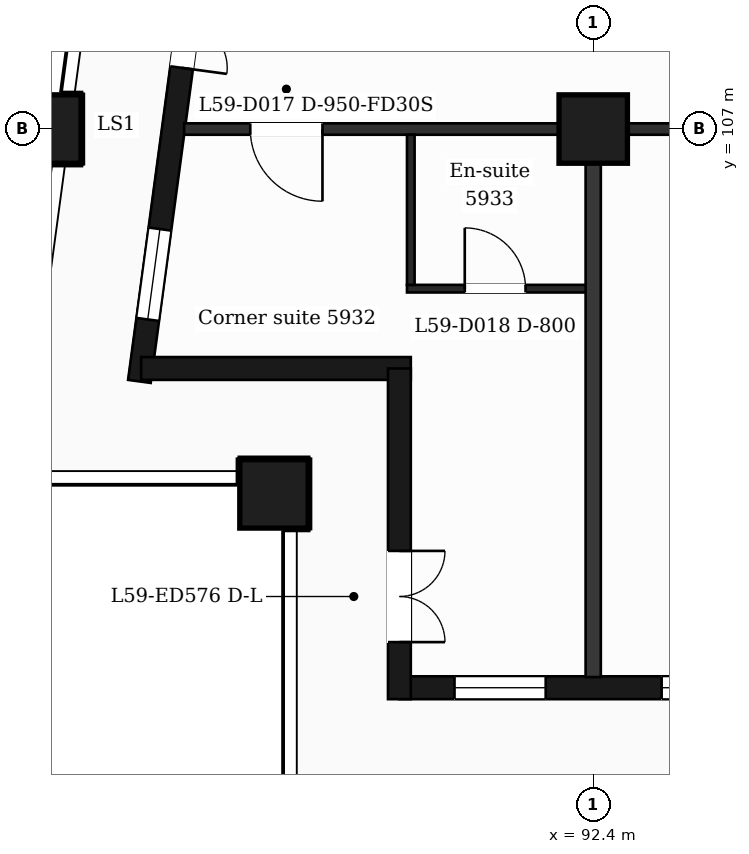
"""IFC4 building model, lengths in metres.
Left out: names, types, materials, properties, quantities, classifications, styles, units other than length and angle.
Written with IfcOpenShell. Run it as: python <this file> out.ifc"""

import sys

from ifc_helpers import new_model, si_unit, direction, frame, frame_2d, origin, origin_2d, place, context, subcontext, project, spatial, rectangle, extrude, element, fill, save


model = new_model("IFC4")
c1 = context("Model", 3, precision=1e-05, world=origin(), true_north=direction((0.0, 1.0)))
c2 = subcontext(c1, "Body", "Model", "MODEL_VIEW")
j1 = project(units=[si_unit("LENGTHUNIT", "METRE"), si_unit("PLANEANGLEUNIT", "RADIAN")], contexts=[c1])
p1 = place(None, origin())
s1 = spatial("IfcSite", under=j1, at=p1, CompositionType="ELEMENT")
p2 = place(p1, origin())
s2 = spatial("IfcBuilding", under=s1, at=p2, CompositionType="ELEMENT")
p3 = place(p2, frame((0.0, 0.0, 242.9)))
s3 = spatial("IfcBuildingStorey", under=s2, at=p3, CompositionType="ELEMENT", Elevation=242.9)
for number, where, z_axis, x_axis in (
    (1, (88.2, 102.2, 0.0), (0.0, 0.0, 1.0), (1.0, 0.0, 0.0)),
    (2, (92.4, 107.0, 0.0), (0.0, 0.0, 1.0), (1.0, 0.0, 0.0)),
    (3, (85.211, 107.0, 0.0), (0.0, 0.0, 1.0), (1.0, 0.0, 0.0)),
):
    element("IfcColumn", number, at=place(p3, frame(where, z_axis=z_axis, x_axis=x_axis)), inside=s3, PredefinedType="COLUMN", context=c2, shape_type="SweptSolid", body=[
        extrude(rectangle(XDim=0.9, YDim=0.9, at=origin_2d()), origin(), (0.0, 0.0, 1.0), 3.7),
    ])
p4 = place(p3, frame((89.85, 99.65, 0.0), z_axis=(0.0, 0.0, 1.0), x_axis=(1.0, 0.0, 0.0)))
e4 = element("IfcWall", 4, at=p4, inside=s3, PredefinedType="SOLIDWALL", context=c2, shape_type="SweptSolid", body=[
    extrude(rectangle(XDim=47.25, YDim=0.3, at=frame_2d((23.625, 0.0))), origin(), (0.0, 0.0, 1.0), 3.2),
])
p5 = place(p4, frame((0.725, 0.0, 0.9)))
e5 = element("IfcOpeningElement", 5, at=p5, cuts=e4, PredefinedType="OPENING", context=c2, shape_type="SweptSolid", body=[
    extrude(rectangle(XDim=1.2, YDim=2.1, at=frame_2d((0.6, 1.05))), frame((0.0, 0.16, 0.0), z_axis=(0.0, -1.0, 0.0), x_axis=(1.0, 0.0, 0.0)), (0.0, 0.0, 1.0), 0.32),
])
p6 = place(p4, frame((3.45, 0.0, 0.9)))
e6 = element("IfcOpeningElement", 6, at=p6, cuts=e4, PredefinedType="OPENING", context=c2, shape_type="SweptSolid", body=[
    extrude(rectangle(XDim=2.4, YDim=2.1, at=frame_2d((1.2, 1.05))), frame((0.0, 0.16, 0.0), z_axis=(0.0, -1.0, 0.0), x_axis=(1.0, 0.0, 0.0)), (0.0, 0.0, 1.0), 0.32),
])
p7 = place(p4, frame((7.35, 0.0, 0.0)))
e7 = element("IfcOpeningElement", 7, at=p7, cuts=e4, PredefinedType="OPENING", context=c2, shape_type="SweptSolid", body=[
    extrude(rectangle(XDim=1.2, YDim=2.4, at=frame_2d((0.6, 1.2))), frame((0.0, 0.16, 0.0), z_axis=(0.0, -1.0, 0.0), x_axis=(1.0, 0.0, 0.0)), (0.0, 0.0, 1.0), 0.32),
])
p8 = place(p4, frame((9.15, 0.0, 0.9)))
e8 = element("IfcOpeningElement", 8, at=p8, cuts=e4, PredefinedType="OPENING", context=c2, shape_type="SweptSolid", body=[
    extrude(rectangle(XDim=1.2, YDim=2.1, at=frame_2d((0.6, 1.05))), frame((0.0, 0.16, 0.0), z_axis=(0.0, -1.0, 0.0), x_axis=(1.0, 0.0, 0.0)), (0.0, 0.0, 1.0), 0.32),
])
p9 = place(p4, frame((11.85, 0.0, 0.9)))
e9 = element("IfcOpeningElement", 9, at=p9, cuts=e4, PredefinedType="OPENING", context=c2, shape_type="SweptSolid", body=[
    extrude(rectangle(XDim=2.4, YDim=2.1, at=frame_2d((1.2, 1.05))), frame((0.0, 0.16, 0.0), z_axis=(0.0, -1.0, 0.0), x_axis=(1.0, 0.0, 0.0)), (0.0, 0.0, 1.0), 0.32),
])
p10 = place(p4, frame((16.05, 0.0, 0.9)))
e10 = element("IfcOpeningElement", 10, at=p10, cuts=e4, PredefinedType="OPENING", context=c2, shape_type="SweptSolid", body=[
    extrude(rectangle(XDim=2.4, YDim=2.1, at=frame_2d((1.2, 1.05))), frame((0.0, 0.16, 0.0), z_axis=(0.0, -1.0, 0.0), x_axis=(1.0, 0.0, 0.0)), (0.0, 0.0, 1.0), 0.32),
])
p11 = place(p4, frame((20.85, 0.0, 0.9)))
e11 = element("IfcOpeningElement", 11, at=p11, cuts=e4, PredefinedType="OPENING", context=c2, shape_type="SweptSolid", body=[
    extrude(rectangle(XDim=1.2, YDim=2.1, at=frame_2d((0.6, 1.05))), frame((0.0, 0.16, 0.0), z_axis=(0.0, -1.0, 0.0), x_axis=(1.0, 0.0, 0.0)), (0.0, 0.0, 1.0), 0.32),
])
p12 = place(p4, frame((25.05, 0.0, 0.9)))
e12 = element("IfcOpeningElement", 12, at=p12, cuts=e4, PredefinedType="OPENING", context=c2, shape_type="SweptSolid", body=[
    extrude(rectangle(XDim=1.2, YDim=2.1, at=frame_2d((0.6, 1.05))), frame((0.0, 0.16, 0.0), z_axis=(0.0, -1.0, 0.0), x_axis=(1.0, 0.0, 0.0)), (0.0, 0.0, 1.0), 0.32),
])
p13 = place(p4, frame((28.65, 0.0, 0.9)))
e13 = element("IfcOpeningElement", 13, at=p13, cuts=e4, PredefinedType="OPENING", context=c2, shape_type="SweptSolid", body=[
    extrude(rectangle(XDim=2.4, YDim=2.1, at=frame_2d((1.2, 1.05))), frame((0.0, 0.16, 0.0), z_axis=(0.0, -1.0, 0.0), x_axis=(1.0, 0.0, 0.0)), (0.0, 0.0, 1.0), 0.32),
])
p14 = place(p4, frame((32.85, 0.0, 0.9)))
e14 = element("IfcOpeningElement", 14, at=p14, cuts=e4, PredefinedType="OPENING", context=c2, shape_type="SweptSolid", body=[
    extrude(rectangle(XDim=2.4, YDim=2.1, at=frame_2d((1.2, 1.05))), frame((0.0, 0.16, 0.0), z_axis=(0.0, -1.0, 0.0), x_axis=(1.0, 0.0, 0.0)), (0.0, 0.0, 1.0), 0.32),
])
p15 = place(p4, frame((37.05, 0.0, 0.9)))
e15 = element("IfcOpeningElement", 15, at=p15, cuts=e4, PredefinedType="OPENING", context=c2, shape_type="SweptSolid", body=[
    extrude(rectangle(XDim=2.4, YDim=2.1, at=frame_2d((1.2, 1.05))), frame((0.0, 0.16, 0.0), z_axis=(0.0, -1.0, 0.0), x_axis=(1.0, 0.0, 0.0)), (0.0, 0.0, 1.0), 0.32),
])
p16 = place(p4, frame((41.25, 0.0, 0.9)))
e16 = element("IfcOpeningElement", 16, at=p16, cuts=e4, PredefinedType="OPENING", context=c2, shape_type="SweptSolid", body=[
    extrude(rectangle(XDim=2.4, YDim=2.1, at=frame_2d((1.2, 1.05))), frame((0.0, 0.16, 0.0), z_axis=(0.0, -1.0, 0.0), x_axis=(1.0, 0.0, 0.0)), (0.0, 0.0, 1.0), 0.32),
])
p17 = place(p4, frame((45.25, 0.0, 0.9)))
e17 = element("IfcOpeningElement", 17, at=p17, cuts=e4, PredefinedType="OPENING", context=c2, shape_type="SweptSolid", body=[
    extrude(rectangle(XDim=1.2, YDim=2.1, at=frame_2d((0.6, 1.05))), frame((0.0, 0.16, 0.0), z_axis=(0.0, -1.0, 0.0), x_axis=(1.0, 0.0, 0.0)), (0.0, 0.0, 1.0), 0.32),
])
p18 = place(p3, frame((87.334, 110.4, 0.0), z_axis=(0.0, 0.0, 1.0), x_axis=(-0.133437175554, -0.991057273915, 0.0)))
e18 = element("IfcWall", 18, at=p18, inside=s3, PredefinedType="SOLIDWALL", context=c2, shape_type="SweptSolid", body=[
    extrude(rectangle(XDim=6.781, YDim=0.3, at=frame_2d((3.39, 0.0))), origin(), (0.0, 0.0, 1.0), 3.2),
])
p19 = place(p18, frame((1.418, 0.0, 0.0)))
e19 = element("IfcOpeningElement", 19, at=p19, cuts=e18, PredefinedType="OPENING", context=c2, shape_type="SweptSolid", body=[
    extrude(rectangle(XDim=1.2, YDim=2.4, at=frame_2d((0.6, 1.2))), frame((0.0, 0.16, 0.0), z_axis=(0.0, -1.0, 0.0), x_axis=(1.0, 0.0, 0.0)), (0.0, 0.0, 1.0), 0.32),
])
p20 = place(p18, frame((4.758, 0.0, 0.9)))
e20 = element("IfcOpeningElement", 20, at=p20, cuts=e18, PredefinedType="OPENING", context=c2, shape_type="SweptSolid", body=[
    extrude(rectangle(XDim=1.2, YDim=2.1, at=frame_2d((0.6, 1.05))), frame((0.0, 0.16, 0.0), z_axis=(0.0, -1.0, 0.0), x_axis=(1.0, 0.0, 0.0)), (0.0, 0.0, 1.0), 0.32),
])
p21 = place(p3, frame((86.452, 103.85, 0.0), z_axis=(0.0, 0.0, 1.0), x_axis=(1.0, 0.0, 0.0)))
e21 = element("IfcWall", 21, at=p21, inside=s3, PredefinedType="SOLIDWALL", context=c2, shape_type="SweptSolid", body=[
    extrude(rectangle(XDim=3.548, YDim=0.3, at=frame_2d((1.774, 0.0))), origin(), (0.0, 0.0, 1.0), 3.2),
])
p22 = place(p3, frame((89.85, 103.85, 0.0), z_axis=(0.0, 0.0, 1.0), x_axis=(0.0, -1.0, 0.0)))
e22 = element("IfcWall", 22, at=p22, inside=s3, PredefinedType="SOLIDWALL", context=c2, shape_type="SweptSolid", body=[
    extrude(rectangle(XDim=4.35, YDim=0.3, at=frame_2d((2.175, 0.0))), origin(), (0.0, 0.0, 1.0), 3.2),
])
p23 = place(p22, frame((2.4, 0.0, 0.0)))
e23 = element("IfcOpeningElement", 23, at=p23, cuts=e22, PredefinedType="OPENING", context=c2, shape_type="SweptSolid", body=[
    extrude(rectangle(XDim=1.2, YDim=2.4, at=frame_2d((0.6, 1.2))), frame((0.0, 0.16, 0.0), z_axis=(0.0, -1.0, 0.0), x_axis=(1.0, 0.0, 0.0)), (0.0, 0.0, 1.0), 0.32),
])
p24 = place(p3, frame((89.95, 104.9, 0.0), z_axis=(0.0, 0.0, 1.0), x_axis=(1.0, 0.0, 0.0)))
e24 = element("IfcWall", 24, at=p24, inside=s3, PredefinedType="PARTITIONING", context=c2, shape_type="SweptSolid", body=[
    extrude(rectangle(XDim=2.45, YDim=0.1, at=frame_2d((1.225, 0.0))), origin(), (0.0, 0.0, 1.0), 3.2),
])
p25 = place(p24, frame((0.76, 0.0, 0.0)))
e25 = element("IfcOpeningElement", 25, at=p25, cuts=e24, PredefinedType="OPENING", context=c2, shape_type="SweptSolid", body=[
    extrude(rectangle(XDim=0.8, YDim=2.1, at=frame_2d((0.4, 1.05))), frame((0.0, 0.06, 0.0), z_axis=(0.0, -1.0, 0.0), x_axis=(1.0, 0.0, 0.0)), (0.0, 0.0, 1.0), 0.12),
])
p26 = place(p3, frame((87.018, 107.0, 0.0), z_axis=(0.0, 0.0, 1.0), x_axis=(1.0, 0.0, 0.0)))
e26 = element("IfcWall", 26, at=p26, inside=s3, PredefinedType="PARTITIONING", context=c2, shape_type="SweptSolid", body=[
    extrude(rectangle(XDim=52.765, YDim=0.15, at=frame_2d((26.382, 0.0))), origin(), (0.0, 0.0, 1.0), 3.2),
])
p27 = place(p26, frame((0.87, 0.0, 0.0)))
e27 = element("IfcOpeningElement", 27, at=p27, cuts=e26, PredefinedType="OPENING", context=c2, shape_type="SweptSolid", body=[
    extrude(rectangle(XDim=0.95, YDim=2.1, at=frame_2d((0.475, 1.05))), frame((0.0, 0.085, 0.0), z_axis=(0.0, -1.0, 0.0), x_axis=(1.0, 0.0, 0.0)), (0.0, 0.0, 1.0), 0.17),
])
p28 = place(p26, frame((7.757, 0.0, 0.0)))
e28 = element("IfcOpeningElement", 28, at=p28, cuts=e26, PredefinedType="OPENING", context=c2, shape_type="SweptSolid", body=[
    extrude(rectangle(XDim=0.95, YDim=2.1, at=frame_2d((0.475, 1.05))), frame((0.0, 0.085, 0.0), z_axis=(0.0, -1.0, 0.0), x_axis=(1.0, 0.0, 0.0)), (0.0, 0.0, 1.0), 0.17),
])
p29 = place(p26, frame((16.57, 0.0, 0.0)))
e29 = element("IfcOpeningElement", 29, at=p29, cuts=e26, PredefinedType="OPENING", context=c2, shape_type="SweptSolid", body=[
    extrude(rectangle(XDim=0.95, YDim=2.1, at=frame_2d((0.475, 1.05))), frame((0.0, 0.085, 0.0), z_axis=(0.0, -1.0, 0.0), x_axis=(1.0, 0.0, 0.0)), (0.0, 0.0, 1.0), 0.17),
])
p30 = place(p26, frame((18.782, 0.0, 0.0)))
e30 = element("IfcOpeningElement", 30, at=p30, cuts=e26, PredefinedType="OPENING", context=c2, shape_type="SweptSolid", body=[
    extrude(rectangle(XDim=0.95, YDim=2.1, at=frame_2d((0.475, 1.05))), frame((0.0, 0.085, 0.0), z_axis=(0.0, -1.0, 0.0), x_axis=(1.0, 0.0, 0.0)), (0.0, 0.0, 1.0), 0.17),
])
p31 = place(p26, frame((24.519, 0.0, 0.0)))
e31 = element("IfcOpeningElement", 31, at=p31, cuts=e26, PredefinedType="OPENING", context=c2, shape_type="SweptSolid", body=[
    extrude(rectangle(XDim=0.95, YDim=2.1, at=frame_2d((0.475, 1.05))), frame((0.0, 0.085, 0.0), z_axis=(0.0, -1.0, 0.0), x_axis=(1.0, 0.0, 0.0)), (0.0, 0.0, 1.0), 0.17),
])
p32 = place(p26, frame((26.919, 0.0, 0.0)))
e32 = element("IfcOpeningElement", 32, at=p32, cuts=e26, PredefinedType="OPENING", context=c2, shape_type="SweptSolid", body=[
    extrude(rectangle(XDim=0.95, YDim=2.1, at=frame_2d((0.475, 1.05))), frame((0.0, 0.085, 0.0), z_axis=(0.0, -1.0, 0.0), x_axis=(1.0, 0.0, 0.0)), (0.0, 0.0, 1.0), 0.17),
])
p33 = place(p26, frame((33.557, 0.0, 0.0)))
e33 = element("IfcOpeningElement", 33, at=p33, cuts=e26, PredefinedType="OPENING", context=c2, shape_type="SweptSolid", body=[
    extrude(rectangle(XDim=0.95, YDim=2.1, at=frame_2d((0.475, 1.05))), frame((0.0, 0.085, 0.0), z_axis=(0.0, -1.0, 0.0), x_axis=(1.0, 0.0, 0.0)), (0.0, 0.0, 1.0), 0.17),
])
p34 = place(p26, frame((40.157, 0.0, 0.0)))
e34 = element("IfcOpeningElement", 34, at=p34, cuts=e26, PredefinedType="OPENING", context=c2, shape_type="SweptSolid", body=[
    extrude(rectangle(XDim=1.0, YDim=2.1, at=frame_2d((0.5, 1.05))), frame((0.0, 0.085, 0.0), z_axis=(0.0, -1.0, 0.0), x_axis=(1.0, 0.0, 0.0)), (0.0, 0.0, 1.0), 0.17),
])
p35 = place(p26, frame((48.767, 0.0, 0.0)))
e35 = element("IfcOpeningElement", 35, at=p35, cuts=e26, PredefinedType="OPENING", context=c2, shape_type="SweptSolid", body=[
    extrude(rectangle(XDim=0.95, YDim=2.1, at=frame_2d((0.475, 1.05))), frame((0.0, 0.085, 0.0), z_axis=(0.0, -1.0, 0.0), x_axis=(1.0, 0.0, 0.0)), (0.0, 0.0, 1.0), 0.17),
])
p36 = place(p3, frame((90.0, 104.95, 0.0), z_axis=(0.0, 0.0, 1.0), x_axis=(0.0, 1.0, 0.0)))
e36 = element("IfcWall", 36, at=p36, inside=s3, PredefinedType="PARTITIONING", context=c2, shape_type="SweptSolid", body=[
    extrude(rectangle(XDim=1.975, YDim=0.1, at=frame_2d((0.988, 0.0))), origin(), (0.0, 0.0, 1.0), 3.2),
])
p37 = place(p3, frame((92.4, 99.79, 0.0), z_axis=(0.0, 0.0, 1.0), x_axis=(0.0, 1.0, 0.0)))
e37 = element("IfcWall", 37, at=p37, inside=s3, PredefinedType="PARTITIONING", context=c2, shape_type="SweptSolid", body=[
    extrude(rectangle(XDim=7.135, YDim=0.2, at=frame_2d((3.567, 0.0))), origin(), (0.0, 0.0, 1.0), 3.2),
])
p38 = place(p5, origin())
e38 = element("IfcWindow", 38, at=p38, inside=s3, PartitioningType="SINGLE_PANEL", PredefinedType="WINDOW", context=c2, shape_type="SweptSolid", body=[
    extrude(rectangle(XDim=1.2, YDim=2.1, at=frame_2d((0.6, 1.05))), frame((0.0, 0.03, 0.0), z_axis=(0.0, -1.0, 0.0), x_axis=(1.0, 0.0, 0.0)), (0.0, 0.0, 1.0), 0.06),
])
fill(e5, e38)
p39 = place(p6, origin())
e39 = element("IfcWindow", 39, at=p39, inside=s3, PartitioningType="SINGLE_PANEL", PredefinedType="WINDOW", context=c2, shape_type="SweptSolid", body=[
    extrude(rectangle(XDim=2.4, YDim=2.1, at=frame_2d((1.2, 1.05))), frame((0.0, 0.03, 0.0), z_axis=(0.0, -1.0, 0.0), x_axis=(1.0, 0.0, 0.0)), (0.0, 0.0, 1.0), 0.06),
])
fill(e6, e39)
p40 = place(p19, origin())
e40 = element("IfcDoor", 40, at=p40, inside=s3, OperationType="DOUBLE_DOOR_SINGLE_SWING", PredefinedType="DOOR", context=c2, shape_type="SweptSolid", body=[
    extrude(rectangle(XDim=1.2, YDim=2.4, at=frame_2d((0.6, 1.2))), frame((0.0, 0.025, 0.0), z_axis=(0.0, -1.0, 0.0), x_axis=(1.0, 0.0, 0.0)), (0.0, 0.0, 1.0), 0.05),
])
fill(e19, e40)
p41 = place(p20, origin())
e41 = element("IfcWindow", 41, at=p41, inside=s3, PartitioningType="SINGLE_PANEL", PredefinedType="WINDOW", context=c2, shape_type="SweptSolid", body=[
    extrude(rectangle(XDim=1.2, YDim=2.1, at=frame_2d((0.6, 1.05))), frame((0.0, 0.03, 0.0), z_axis=(0.0, -1.0, 0.0), x_axis=(1.0, 0.0, 0.0)), (0.0, 0.0, 1.0), 0.06),
])
fill(e20, e41)
p42 = place(p23, origin())
e42 = element("IfcDoor", 42, at=p42, inside=s3, OperationType="DOUBLE_DOOR_SINGLE_SWING", PredefinedType="DOOR", context=c2, shape_type="SweptSolid", body=[
    extrude(rectangle(XDim=1.2, YDim=2.4, at=frame_2d((0.6, 1.2))), frame((0.0, 0.025, 0.0), z_axis=(0.0, -1.0, 0.0), x_axis=(1.0, 0.0, 0.0)), (0.0, 0.0, 1.0), 0.05),
])
fill(e23, e42)
p43 = place(p27, origin())
e43 = element("IfcDoor", 43, at=p43, inside=s3, OperationType="SINGLE_SWING_RIGHT", PredefinedType="DOOR", context=c2, shape_type="SweptSolid", body=[
    extrude(rectangle(XDim=0.95, YDim=2.1, at=frame_2d((0.475, 1.05))), frame((0.0, 0.025, 0.0), z_axis=(0.0, -1.0, 0.0), x_axis=(1.0, 0.0, 0.0)), (0.0, 0.0, 1.0), 0.05),
])
fill(e27, e43)
p44 = place(p25, origin())
e44 = element("IfcDoor", 44, at=p44, inside=s3, OperationType="SINGLE_SWING_LEFT", PredefinedType="DOOR", context=c2, shape_type="SweptSolid", body=[
    extrude(rectangle(XDim=0.8, YDim=2.1, at=frame_2d((0.4, 1.05))), frame((0.0, 0.025, 0.0), z_axis=(0.0, -1.0, 0.0), x_axis=(1.0, 0.0, 0.0)), (0.0, 0.0, 1.0), 0.05),
])
fill(e25, e44)
save(model, sys.argv[1])
